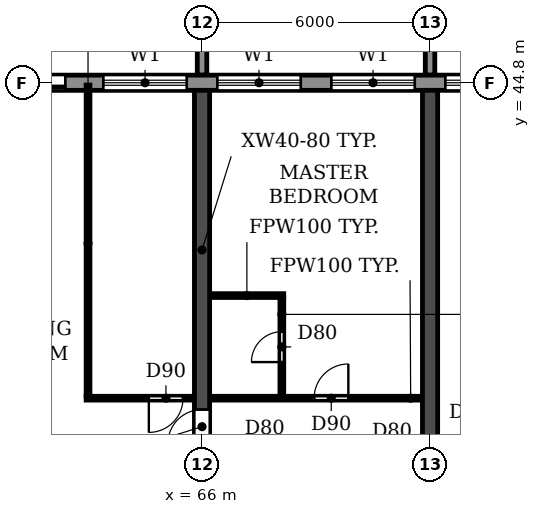
"""IFC4 building model, lengths in metres.
Left out: names, types, materials, properties, quantities, classifications, styles, units other than length and angle.
Written with IfcOpenShell. Run it as: python <this file> out.ifc"""

import sys

from ifc_helpers import new_model, si_unit, direction, frame, frame_2d, origin, place, context, subcontext, project, spatial, polyline, rectangle, outline, extrude, source, transform, mapped, element, fill, save


model = new_model("IFC4")
c1 = context("Model", 3, precision=1e-05, world=origin(), true_north=direction((0.0, 1.0)))
c2 = subcontext(c1, "Body", "Model", "MODEL_VIEW")
j1 = project(units=[si_unit("LENGTHUNIT", "METRE"), si_unit("PLANEANGLEUNIT", "RADIAN")], contexts=[c1])
p1 = place(None, origin())
s1 = spatial("IfcSite", under=j1, at=p1, CompositionType="ELEMENT")
p2 = place(p1, origin())
s2 = spatial("IfcBuilding", under=s1, at=p2, CompositionType="ELEMENT")
p3 = place(p2, frame((0.0, 0.0, 26.7)))
s3 = spatial("IfcBuildingStorey", under=s2, at=p3, CompositionType="ELEMENT", Elevation=26.7)
p4 = place(p3, frame((66.0, 30.55, 0.0), z_axis=(0.0, 0.0, 1.0), x_axis=(0.0, 1.0, 0.0)))
e1 = element("IfcWall", 1, at=p4, inside=s3, PredefinedType="SHEAR", context=c2, shape_type="SweptSolid", body=[
    extrude(rectangle(XDim=14.05, YDim=0.4, at=frame_2d((7.025, 0.0))), origin(), (0.0, 0.0, 1.0), 3.05),
])
p5 = place(p4, frame((4.75, 0.0, 0.0)))
e2 = element("IfcOpeningElement", 2, at=p5, cuts=e1, PredefinedType="OPENING", context=c2, shape_type="SweptSolid", body=[
    extrude(rectangle(XDim=0.9, YDim=2.1, at=frame_2d((0.45, 1.05))), frame((0.0, 0.21, 0.0), z_axis=(0.0, -1.0, 0.0), x_axis=(1.0, 0.0, 0.0)), (0.0, 0.0, 1.0), 0.42),
])
p6 = place(p3, frame((72.0, 30.55, 0.0), z_axis=(0.0, 0.0, 1.0), x_axis=(0.0, 1.0, 0.0)))
e3 = element("IfcWall", 3, at=p6, inside=s3, PredefinedType="SHEAR", context=c2, shape_type="SweptSolid", body=[
    extrude(rectangle(XDim=14.05, YDim=0.4, at=frame_2d((7.025, 0.0))), origin(), (0.0, 0.0, 1.0), 3.05),
])
p7 = place(p3, frame((97.317, 44.8, 0.0), z_axis=(0.0, 0.0, 1.0), x_axis=(-1.0, 0.0, 0.0)))
e4 = element("IfcWall", 4, at=p7, inside=s3, PredefinedType="STANDARD", context=c2, shape_type="SweptSolid", body=[
    extrude(rectangle(XDim=92.634, YDim=0.4, at=frame_2d((46.317, 0.0))), origin(), (0.0, 0.0, 1.0), 3.05),
])
p8 = place(p7, frame((88.717, 0.0, 0.9)))
e5 = element("IfcOpeningElement", 5, at=p8, cuts=e4, PredefinedType="OPENING", context=c2, shape_type="SweptSolid", body=[
    extrude(rectangle(XDim=2.2, YDim=1.5, at=frame_2d((1.1, 0.75))), frame((0.0, 0.21, 0.0), z_axis=(0.0, -1.0, 0.0), x_axis=(1.0, 0.0, 0.0)), (0.0, 0.0, 1.0), 0.42),
])
p9 = place(p7, frame((85.917, 0.0, 0.0)))
e6 = element("IfcOpeningElement", 6, at=p9, cuts=e4, PredefinedType="OPENING", context=c2, shape_type="SweptSolid", body=[
    extrude(rectangle(XDim=1.8, YDim=2.4, at=frame_2d((0.9, 1.2))), frame((0.0, 0.21, 0.0), z_axis=(0.0, -1.0, 0.0), x_axis=(1.0, 0.0, 0.0)), (0.0, 0.0, 1.0), 0.42),
])
p10 = place(p7, frame((82.717, 0.0, 0.9)))
e7 = element("IfcOpeningElement", 7, at=p10, cuts=e4, PredefinedType="OPENING", context=c2, shape_type="SweptSolid", body=[
    extrude(rectangle(XDim=2.2, YDim=1.5, at=frame_2d((1.1, 0.75))), frame((0.0, 0.21, 0.0), z_axis=(0.0, -1.0, 0.0), x_axis=(1.0, 0.0, 0.0)), (0.0, 0.0, 1.0), 0.42),
])
p11 = place(p7, frame((79.717, 0.0, 0.9)))
e8 = element("IfcOpeningElement", 8, at=p11, cuts=e4, PredefinedType="OPENING", context=c2, shape_type="SweptSolid", body=[
    extrude(rectangle(XDim=2.2, YDim=1.5, at=frame_2d((1.1, 0.75))), frame((0.0, 0.21, 0.0), z_axis=(0.0, -1.0, 0.0), x_axis=(1.0, 0.0, 0.0)), (0.0, 0.0, 1.0), 0.42),
])
p12 = place(p7, frame((76.917, 0.0, 0.0)))
e9 = element("IfcOpeningElement", 9, at=p12, cuts=e4, PredefinedType="OPENING", context=c2, shape_type="SweptSolid", body=[
    extrude(rectangle(XDim=1.8, YDim=2.4, at=frame_2d((0.9, 1.2))), frame((0.0, 0.21, 0.0), z_axis=(0.0, -1.0, 0.0), x_axis=(1.0, 0.0, 0.0)), (0.0, 0.0, 1.0), 0.42),
])
p13 = place(p7, frame((73.717, 0.0, 0.9)))
e10 = element("IfcOpeningElement", 10, at=p13, cuts=e4, PredefinedType="OPENING", context=c2, shape_type="SweptSolid", body=[
    extrude(rectangle(XDim=2.2, YDim=1.5, at=frame_2d((1.1, 0.75))), frame((0.0, 0.21, 0.0), z_axis=(0.0, -1.0, 0.0), x_axis=(1.0, 0.0, 0.0)), (0.0, 0.0, 1.0), 0.42),
])
p14 = place(p7, frame((70.717, 0.0, 0.9)))
e11 = element("IfcOpeningElement", 11, at=p14, cuts=e4, PredefinedType="OPENING", context=c2, shape_type="SweptSolid", body=[
    extrude(rectangle(XDim=2.2, YDim=1.5, at=frame_2d((1.1, 0.75))), frame((0.0, 0.21, 0.0), z_axis=(0.0, -1.0, 0.0), x_axis=(1.0, 0.0, 0.0)), (0.0, 0.0, 1.0), 0.42),
])
p15 = place(p7, frame((67.717, 0.0, 0.9)))
e12 = element("IfcOpeningElement", 12, at=p15, cuts=e4, PredefinedType="OPENING", context=c2, shape_type="SweptSolid", body=[
    extrude(rectangle(XDim=2.2, YDim=1.5, at=frame_2d((1.1, 0.75))), frame((0.0, 0.21, 0.0), z_axis=(0.0, -1.0, 0.0), x_axis=(1.0, 0.0, 0.0)), (0.0, 0.0, 1.0), 0.42),
])
p16 = place(p7, frame((64.917, 0.0, 0.0)))
e13 = element("IfcOpeningElement", 13, at=p16, cuts=e4, PredefinedType="OPENING", context=c2, shape_type="SweptSolid", body=[
    extrude(rectangle(XDim=1.8, YDim=2.4, at=frame_2d((0.9, 1.2))), frame((0.0, 0.21, 0.0), z_axis=(0.0, -1.0, 0.0), x_axis=(1.0, 0.0, 0.0)), (0.0, 0.0, 1.0), 0.42),
])
p17 = place(p7, frame((61.717, 0.0, 0.9)))
e14 = element("IfcOpeningElement", 14, at=p17, cuts=e4, PredefinedType="OPENING", context=c2, shape_type="SweptSolid", body=[
    extrude(rectangle(XDim=2.2, YDim=1.5, at=frame_2d((1.1, 0.75))), frame((0.0, 0.21, 0.0), z_axis=(0.0, -1.0, 0.0), x_axis=(1.0, 0.0, 0.0)), (0.0, 0.0, 1.0), 0.42),
])
p18 = place(p7, frame((58.717, 0.0, 0.9)))
e15 = element("IfcOpeningElement", 15, at=p18, cuts=e4, PredefinedType="OPENING", context=c2, shape_type="SweptSolid", body=[
    extrude(rectangle(XDim=2.2, YDim=1.5, at=frame_2d((1.1, 0.75))), frame((0.0, 0.21, 0.0), z_axis=(0.0, -1.0, 0.0), x_axis=(1.0, 0.0, 0.0)), (0.0, 0.0, 1.0), 0.42),
])
p19 = place(p7, frame((55.917, 0.0, 0.0)))
e16 = element("IfcOpeningElement", 16, at=p19, cuts=e4, PredefinedType="OPENING", context=c2, shape_type="SweptSolid", body=[
    extrude(rectangle(XDim=1.8, YDim=2.4, at=frame_2d((0.9, 1.2))), frame((0.0, 0.21, 0.0), z_axis=(0.0, -1.0, 0.0), x_axis=(1.0, 0.0, 0.0)), (0.0, 0.0, 1.0), 0.42),
])
p20 = place(p7, frame((52.917, 0.0, 0.0)))
e17 = element("IfcOpeningElement", 17, at=p20, cuts=e4, PredefinedType="OPENING", context=c2, shape_type="SweptSolid", body=[
    extrude(rectangle(XDim=1.8, YDim=2.4, at=frame_2d((0.9, 1.2))), frame((0.0, 0.21, 0.0), z_axis=(0.0, -1.0, 0.0), x_axis=(1.0, 0.0, 0.0)), (0.0, 0.0, 1.0), 0.42),
])
p21 = place(p7, frame((49.717, 0.0, 0.9)))
e18 = element("IfcOpeningElement", 18, at=p21, cuts=e4, PredefinedType="OPENING", context=c2, shape_type="SweptSolid", body=[
    extrude(rectangle(XDim=2.2, YDim=1.5, at=frame_2d((1.1, 0.75))), frame((0.0, 0.21, 0.0), z_axis=(0.0, -1.0, 0.0), x_axis=(1.0, 0.0, 0.0)), (0.0, 0.0, 1.0), 0.42),
])
p22 = place(p7, frame((46.917, 0.0, 0.0)))
e19 = element("IfcOpeningElement", 19, at=p22, cuts=e4, PredefinedType="OPENING", context=c2, shape_type="SweptSolid", body=[
    extrude(rectangle(XDim=1.8, YDim=2.4, at=frame_2d((0.9, 1.2))), frame((0.0, 0.21, 0.0), z_axis=(0.0, -1.0, 0.0), x_axis=(1.0, 0.0, 0.0)), (0.0, 0.0, 1.0), 0.42),
])
p23 = place(p7, frame((43.717, 0.0, 0.9)))
e20 = element("IfcOpeningElement", 20, at=p23, cuts=e4, PredefinedType="OPENING", context=c2, shape_type="SweptSolid", body=[
    extrude(rectangle(XDim=2.2, YDim=1.5, at=frame_2d((1.1, 0.75))), frame((0.0, 0.21, 0.0), z_axis=(0.0, -1.0, 0.0), x_axis=(1.0, 0.0, 0.0)), (0.0, 0.0, 1.0), 0.42),
])
p24 = place(p7, frame((40.717, 0.0, 0.9)))
e21 = element("IfcOpeningElement", 21, at=p24, cuts=e4, PredefinedType="OPENING", context=c2, shape_type="SweptSolid", body=[
    extrude(rectangle(XDim=2.2, YDim=1.5, at=frame_2d((1.1, 0.75))), frame((0.0, 0.21, 0.0), z_axis=(0.0, -1.0, 0.0), x_axis=(1.0, 0.0, 0.0)), (0.0, 0.0, 1.0), 0.42),
])
p25 = place(p7, frame((37.917, 0.0, 0.0)))
e22 = element("IfcOpeningElement", 22, at=p25, cuts=e4, PredefinedType="OPENING", context=c2, shape_type="SweptSolid", body=[
    extrude(rectangle(XDim=1.8, YDim=2.4, at=frame_2d((0.9, 1.2))), frame((0.0, 0.21, 0.0), z_axis=(0.0, -1.0, 0.0), x_axis=(1.0, 0.0, 0.0)), (0.0, 0.0, 1.0), 0.42),
])
p26 = place(p7, frame((34.917, 0.0, 0.0)))
e23 = element("IfcOpeningElement", 23, at=p26, cuts=e4, PredefinedType="OPENING", context=c2, shape_type="SweptSolid", body=[
    extrude(rectangle(XDim=1.8, YDim=2.4, at=frame_2d((0.9, 1.2))), frame((0.0, 0.21, 0.0), z_axis=(0.0, -1.0, 0.0), x_axis=(1.0, 0.0, 0.0)), (0.0, 0.0, 1.0), 0.42),
])
p27 = place(p7, frame((31.717, 0.0, 0.9)))
e24 = element("IfcOpeningElement", 24, at=p27, cuts=e4, PredefinedType="OPENING", context=c2, shape_type="SweptSolid", body=[
    extrude(rectangle(XDim=2.2, YDim=1.5, at=frame_2d((1.1, 0.75))), frame((0.0, 0.21, 0.0), z_axis=(0.0, -1.0, 0.0), x_axis=(1.0, 0.0, 0.0)), (0.0, 0.0, 1.0), 0.42),
])
p28 = place(p7, frame((28.717, 0.0, 0.9)))
e25 = element("IfcOpeningElement", 25, at=p28, cuts=e4, PredefinedType="OPENING", context=c2, shape_type="SweptSolid", body=[
    extrude(rectangle(XDim=2.2, YDim=1.5, at=frame_2d((1.1, 0.75))), frame((0.0, 0.21, 0.0), z_axis=(0.0, -1.0, 0.0), x_axis=(1.0, 0.0, 0.0)), (0.0, 0.0, 1.0), 0.42),
])
p29 = place(p7, frame((25.717, 0.0, 0.9)))
e26 = element("IfcOpeningElement", 26, at=p29, cuts=e4, PredefinedType="OPENING", context=c2, shape_type="SweptSolid", body=[
    extrude(rectangle(XDim=2.2, YDim=1.5, at=frame_2d((1.1, 0.75))), frame((0.0, 0.21, 0.0), z_axis=(0.0, -1.0, 0.0), x_axis=(1.0, 0.0, 0.0)), (0.0, 0.0, 1.0), 0.42),
])
p30 = place(p7, frame((22.717, 0.0, 0.9)))
e27 = element("IfcOpeningElement", 27, at=p30, cuts=e4, PredefinedType="OPENING", context=c2, shape_type="SweptSolid", body=[
    extrude(rectangle(XDim=2.2, YDim=1.5, at=frame_2d((1.1, 0.75))), frame((0.0, 0.21, 0.0), z_axis=(0.0, -1.0, 0.0), x_axis=(1.0, 0.0, 0.0)), (0.0, 0.0, 1.0), 0.42),
])
p31 = place(p7, frame((19.917, 0.0, 0.0)))
e28 = element("IfcOpeningElement", 28, at=p31, cuts=e4, PredefinedType="OPENING", context=c2, shape_type="SweptSolid", body=[
    extrude(rectangle(XDim=1.8, YDim=2.4, at=frame_2d((0.9, 1.2))), frame((0.0, 0.21, 0.0), z_axis=(0.0, -1.0, 0.0), x_axis=(1.0, 0.0, 0.0)), (0.0, 0.0, 1.0), 0.42),
])
p32 = place(p7, frame((16.717, 0.0, 0.9)))
e29 = element("IfcOpeningElement", 29, at=p32, cuts=e4, PredefinedType="OPENING", context=c2, shape_type="SweptSolid", body=[
    extrude(rectangle(XDim=2.2, YDim=1.5, at=frame_2d((1.1, 0.75))), frame((0.0, 0.21, 0.0), z_axis=(0.0, -1.0, 0.0), x_axis=(1.0, 0.0, 0.0)), (0.0, 0.0, 1.0), 0.42),
])
p33 = place(p7, frame((13.717, 0.0, 0.9)))
e30 = element("IfcOpeningElement", 30, at=p33, cuts=e4, PredefinedType="OPENING", context=c2, shape_type="SweptSolid", body=[
    extrude(rectangle(XDim=2.2, YDim=1.5, at=frame_2d((1.1, 0.75))), frame((0.0, 0.21, 0.0), z_axis=(0.0, -1.0, 0.0), x_axis=(1.0, 0.0, 0.0)), (0.0, 0.0, 1.0), 0.42),
])
p34 = place(p7, frame((10.717, 0.0, 0.9)))
e31 = element("IfcOpeningElement", 31, at=p34, cuts=e4, PredefinedType="OPENING", context=c2, shape_type="SweptSolid", body=[
    extrude(rectangle(XDim=2.2, YDim=1.5, at=frame_2d((1.1, 0.75))), frame((0.0, 0.21, 0.0), z_axis=(0.0, -1.0, 0.0), x_axis=(1.0, 0.0, 0.0)), (0.0, 0.0, 1.0), 0.42),
])
p35 = place(p7, frame((7.917, 0.0, 0.0)))
e32 = element("IfcOpeningElement", 32, at=p35, cuts=e4, PredefinedType="OPENING", context=c2, shape_type="SweptSolid", body=[
    extrude(rectangle(XDim=1.8, YDim=2.4, at=frame_2d((0.9, 1.2))), frame((0.0, 0.21, 0.0), z_axis=(0.0, -1.0, 0.0), x_axis=(1.0, 0.0, 0.0)), (0.0, 0.0, 1.0), 0.42),
])
p36 = place(p7, frame((4.917, 0.0, 0.0)))
e33 = element("IfcOpeningElement", 33, at=p36, cuts=e4, PredefinedType="OPENING", context=c2, shape_type="SweptSolid", body=[
    extrude(rectangle(XDim=1.8, YDim=2.4, at=frame_2d((0.9, 1.2))), frame((0.0, 0.21, 0.0), z_axis=(0.0, -1.0, 0.0), x_axis=(1.0, 0.0, 0.0)), (0.0, 0.0, 1.0), 0.42),
])
p37 = place(p7, frame((1.717, 0.0, 0.9)))
e34 = element("IfcOpeningElement", 34, at=p37, cuts=e4, PredefinedType="OPENING", context=c2, shape_type="SweptSolid", body=[
    extrude(rectangle(XDim=2.2, YDim=1.5, at=frame_2d((1.1, 0.75))), frame((0.0, 0.21, 0.0), z_axis=(0.0, -1.0, 0.0), x_axis=(1.0, 0.0, 0.0)), (0.0, 0.0, 1.0), 0.42),
])
m1 = source(origin(), c2, "Body", "SweptSolid", [
    extrude(outline(polyline([(0.0, 0.0), (0.25, 0.0), (0.25, 3.1), (0.0, 3.1), (0.0, 0.0)])), origin(), (0.0, 0.0, 1.0), 3.1),
])
for number, where in (
    (35, (65.875, 45.0, 0.0)),
    (36, (71.875, 45.0, 0.0)),
):
    element("IfcWall", number, at=place(p3, frame(where)), inside=s3, PredefinedType="STANDARD", context=c2, shape_type="MappedRepresentation", body=[
        mapped(m1, transform((0.0, 0.0, 0.0))),
    ])
p38 = place(p3, frame((62.95, 36.5, 0.0), z_axis=(0.0, 0.0, 1.0), x_axis=(1.0, 0.0, 0.0)))
e37 = element("IfcWall", 37, at=p38, inside=s3, PredefinedType="PARTITIONING", context=c2, shape_type="SweptSolid", body=[
    extrude(rectangle(XDim=2.84, YDim=0.1, at=frame_2d((1.42, 0.0))), origin(), (0.0, 0.0, 1.0), 3.05),
])
p39 = place(p38, frame((1.65, 0.0, 0.0)))
e38 = element("IfcOpeningElement", 38, at=p39, cuts=e37, PredefinedType="OPENING", context=c2, shape_type="SweptSolid", body=[
    extrude(rectangle(XDim=0.9, YDim=2.1, at=frame_2d((0.45, 1.05))), frame((0.0, 0.06, 0.0), z_axis=(0.0, -1.0, 0.0), x_axis=(1.0, 0.0, 0.0)), (0.0, 0.0, 1.0), 0.12),
])
p40 = place(p3, frame((66.21, 36.5, 0.0), z_axis=(0.0, 0.0, 1.0), x_axis=(1.0, 0.0, 0.0)))
e39 = element("IfcWall", 39, at=p40, inside=s3, PredefinedType="PARTITIONING", context=c2, shape_type="SweptSolid", body=[
    extrude(rectangle(XDim=5.58, YDim=0.1, at=frame_2d((2.79, 0.0))), origin(), (0.0, 0.0, 1.0), 3.05),
])
p41 = place(p40, frame((2.74, 0.0, 0.0)))
e40 = element("IfcOpeningElement", 40, at=p41, cuts=e39, PredefinedType="OPENING", context=c2, shape_type="SweptSolid", body=[
    extrude(rectangle(XDim=0.9, YDim=2.1, at=frame_2d((0.45, 1.05))), frame((0.0, 0.06, 0.0), z_axis=(0.0, -1.0, 0.0), x_axis=(1.0, 0.0, 0.0)), (0.0, 0.0, 1.0), 0.12),
])
p42 = place(p3, frame((66.21, 39.2, 0.0), z_axis=(0.0, 0.0, 1.0), x_axis=(1.0, 0.0, 0.0)))
e41 = element("IfcWall", 41, at=p42, inside=s3, PredefinedType="PARTITIONING", context=c2, shape_type="SweptSolid", body=[
    extrude(rectangle(XDim=1.94, YDim=0.1, at=frame_2d((0.97, 0.0))), origin(), (0.0, 0.0, 1.0), 3.05),
])
p43 = place(p3, frame((63.0, 36.55, 0.0), z_axis=(0.0, 0.0, 1.0), x_axis=(0.0, 1.0, 0.0)))
e42 = element("IfcWall", 42, at=p43, inside=s3, PredefinedType="PARTITIONING", context=c2, shape_type="SweptSolid", body=[
    extrude(rectangle(XDim=8.19, YDim=0.1, at=frame_2d((4.095, 0.0))), origin(), (0.0, 0.0, 1.0), 3.05),
])
p44 = place(p3, frame((68.1, 36.55, 0.0), z_axis=(0.0, 0.0, 1.0), x_axis=(0.0, 1.0, 0.0)))
e43 = element("IfcWall", 43, at=p44, inside=s3, PredefinedType="PARTITIONING", context=c2, shape_type="SweptSolid", body=[
    extrude(rectangle(XDim=2.6, YDim=0.1, at=frame_2d((1.3, 0.0))), origin(), (0.0, 0.0, 1.0), 3.05),
])
p45 = place(p44, frame((0.9, 0.0, 0.0)))
e44 = element("IfcOpeningElement", 44, at=p45, cuts=e43, PredefinedType="OPENING", context=c2, shape_type="SweptSolid", body=[
    extrude(rectangle(XDim=0.8, YDim=2.1, at=frame_2d((0.4, 1.05))), frame((0.0, 0.06, 0.0), z_axis=(0.0, -1.0, 0.0), x_axis=(1.0, 0.0, 0.0)), (0.0, 0.0, 1.0), 0.12),
])
p46 = place(p26, origin())
e45 = element("IfcDoor", 45, at=p46, inside=s3, OperationType="DOUBLE_DOOR_SLIDING", PredefinedType="DOOR", context=c2, shape_type="SweptSolid", body=[
    extrude(rectangle(XDim=1.8, YDim=2.4, at=frame_2d((0.9, 1.2))), frame((0.0, 0.025, 0.0), z_axis=(0.0, -1.0, 0.0), x_axis=(1.0, 0.0, 0.0)), (0.0, 0.0, 1.0), 0.05),
])
fill(e23, e45)
p47 = place(p27, origin())
e46 = element("IfcWindow", 46, at=p47, inside=s3, PartitioningType="DOUBLE_PANEL_HORIZONTAL", PredefinedType="WINDOW", context=c2, shape_type="SweptSolid", body=[
    extrude(rectangle(XDim=2.2, YDim=1.5, at=frame_2d((1.1, 0.75))), frame((0.0, 0.03, 0.0), z_axis=(0.0, -1.0, 0.0), x_axis=(1.0, 0.0, 0.0)), (0.0, 0.0, 1.0), 0.06),
])
fill(e24, e46)
p48 = place(p28, origin())
e47 = element("IfcWindow", 47, at=p48, inside=s3, PartitioningType="DOUBLE_PANEL_HORIZONTAL", PredefinedType="WINDOW", context=c2, shape_type="SweptSolid", body=[
    extrude(rectangle(XDim=2.2, YDim=1.5, at=frame_2d((1.1, 0.75))), frame((0.0, 0.03, 0.0), z_axis=(0.0, -1.0, 0.0), x_axis=(1.0, 0.0, 0.0)), (0.0, 0.0, 1.0), 0.06),
])
fill(e25, e47)
p49 = place(p29, origin())
e48 = element("IfcWindow", 48, at=p49, inside=s3, PartitioningType="DOUBLE_PANEL_HORIZONTAL", PredefinedType="WINDOW", context=c2, shape_type="SweptSolid", body=[
    extrude(rectangle(XDim=2.2, YDim=1.5, at=frame_2d((1.1, 0.75))), frame((0.0, 0.03, 0.0), z_axis=(0.0, -1.0, 0.0), x_axis=(1.0, 0.0, 0.0)), (0.0, 0.0, 1.0), 0.06),
])
fill(e26, e48)
p50 = place(p30, origin())
e49 = element("IfcWindow", 49, at=p50, inside=s3, PartitioningType="DOUBLE_PANEL_HORIZONTAL", PredefinedType="WINDOW", context=c2, shape_type="SweptSolid", body=[
    extrude(rectangle(XDim=2.2, YDim=1.5, at=frame_2d((1.1, 0.75))), frame((0.0, 0.03, 0.0), z_axis=(0.0, -1.0, 0.0), x_axis=(1.0, 0.0, 0.0)), (0.0, 0.0, 1.0), 0.06),
])
fill(e27, e49)
p51 = place(p41, origin())
e50 = element("IfcDoor", 50, at=p51, inside=s3, OperationType="SINGLE_SWING_RIGHT", PredefinedType="DOOR", context=c2, shape_type="SweptSolid", body=[
    extrude(rectangle(XDim=0.9, YDim=2.1, at=frame_2d((0.45, 1.05))), frame((0.0, 0.025, 0.0), z_axis=(0.0, -1.0, 0.0), x_axis=(1.0, 0.0, 0.0)), (0.0, 0.0, 1.0), 0.05),
])
fill(e40, e50)
p52 = place(p39, frame((0.9, 0.0, 0.0), z_axis=(0.0, 0.0, 1.0), x_axis=(-1.0, 0.0, 0.0)))
e51 = element("IfcDoor", 51, at=p52, inside=s3, OperationType="SINGLE_SWING_RIGHT", PredefinedType="DOOR", context=c2, shape_type="SweptSolid", body=[
    extrude(rectangle(XDim=0.9, YDim=2.1, at=frame_2d((0.45, 1.05))), frame((0.0, 0.025, 0.0), z_axis=(0.0, -1.0, 0.0), x_axis=(1.0, 0.0, 0.0)), (0.0, 0.0, 1.0), 0.05),
])
fill(e38, e51)
p53 = place(p5, origin())
e52 = element("IfcDoor", 52, at=p53, inside=s3, OperationType="SINGLE_SWING_LEFT", PredefinedType="DOOR", context=c2, shape_type="SweptSolid", body=[
    extrude(rectangle(XDim=0.9, YDim=2.1, at=frame_2d((0.45, 1.05))), frame((0.0, 0.025, 0.0), z_axis=(0.0, -1.0, 0.0), x_axis=(1.0, 0.0, 0.0)), (0.0, 0.0, 1.0), 0.05),
])
fill(e2, e52)
p54 = place(p45, origin())
e53 = element("IfcDoor", 53, at=p54, inside=s3, OperationType="SINGLE_SWING_LEFT", PredefinedType="DOOR", context=c2, shape_type="SweptSolid", body=[
    extrude(rectangle(XDim=0.8, YDim=2.1, at=frame_2d((0.4, 1.05))), frame((0.0, 0.025, 0.0), z_axis=(0.0, -1.0, 0.0), x_axis=(1.0, 0.0, 0.0)), (0.0, 0.0, 1.0), 0.05),
])
fill(e44, e53)
save(model, sys.argv[1])
